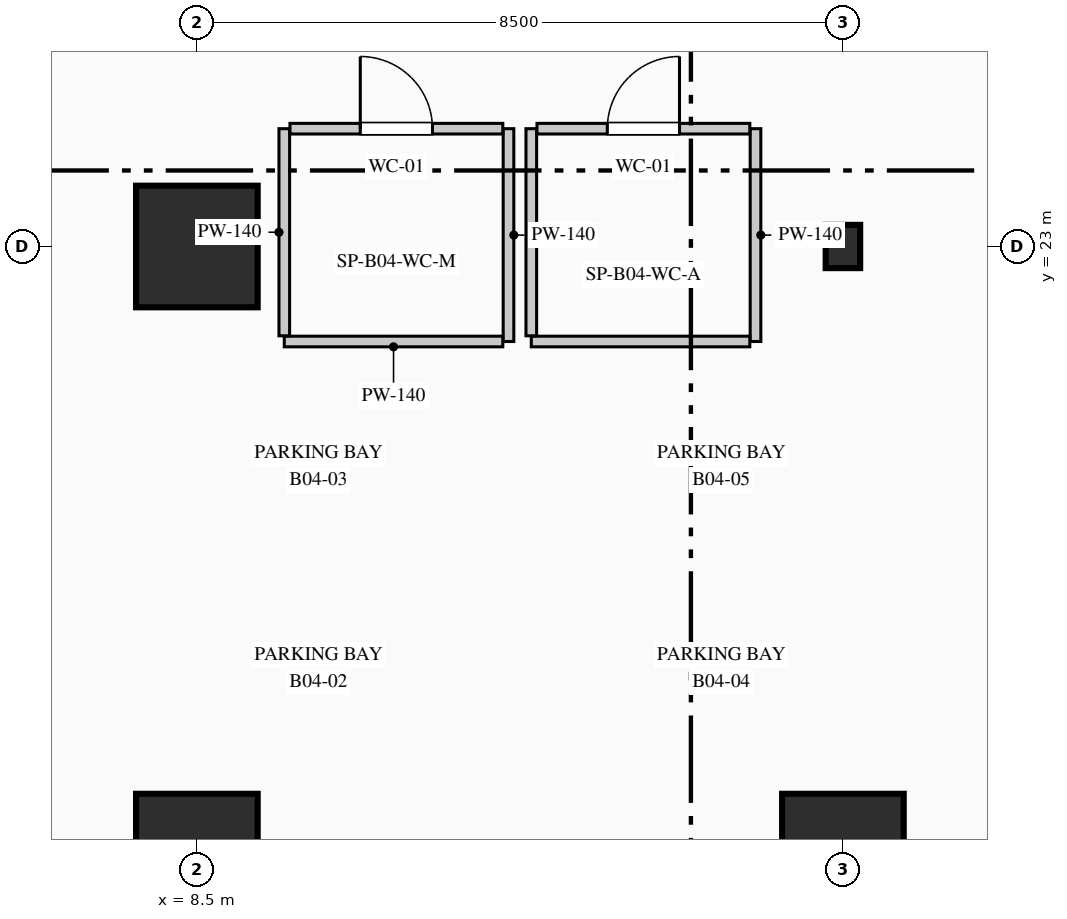
"""IFC4 building model, lengths in metres.
Left out: names, types, materials, properties, quantities, classifications, styles, units other than length and angle.
Written with IfcOpenShell. Run it as: python <this file> out.ifc"""

import sys

from ifc_helpers import new_model, si_unit, direction, frame, frame_2d, origin, origin_2d, place, context, subcontext, project, spatial, rectangle, i_section, extrude, element, fill, save


model = new_model("IFC4")
c1 = context("Model", 3, precision=1e-05, world=origin(), true_north=direction((0.0, 1.0)))
c2 = subcontext(c1, "Body", "Model", "MODEL_VIEW")
j1 = project(units=[si_unit("LENGTHUNIT", "METRE"), si_unit("PLANEANGLEUNIT", "RADIAN")], contexts=[c1])
p1 = place(None, origin())
s1 = spatial("IfcSite", under=j1, at=p1, CompositionType="ELEMENT")
p2 = place(p1, origin())
s2 = spatial("IfcBuilding", under=s1, at=p2, CompositionType="ELEMENT")
p3 = place(p2, frame((0.0, 0.0, -18.0)))
s3 = spatial("IfcBuildingStorey", under=s2, at=p3, CompositionType="ELEMENT", Elevation=-18.0)
for number, where, z_axis, x_axis in (
    (1, (8.5, 15.0, 0.0), (0.0, 0.0, 1.0), (1.0, 0.0, 0.0)),
    (2, (8.5, 23.0, 0.0), (0.0, 0.0, 1.0), (1.0, 0.0, 0.0)),
    (3, (17.0, 15.0, 0.0), (0.0, 0.0, 1.0), (1.0, 0.0, 0.0)),
):
    element("IfcColumn", number, at=place(p3, frame(where, z_axis=z_axis, x_axis=x_axis)), inside=s3, PredefinedType="COLUMN", context=c2, shape_type="SweptSolid", body=[
        extrude(rectangle(XDim=1.6, YDim=1.6, at=origin_2d()), origin(), (0.0, 0.0, 1.0), 4.5),
    ])
p4 = place(p3, frame((17.0, 23.0, 0.0), z_axis=(0.0, 0.0, 1.0), x_axis=(1.0, 0.0, 0.0)))
e4 = element("IfcColumn", 4, at=p4, inside=s3, PredefinedType="COLUMN", context=c2, shape_type="SweptSolid", body=[
    extrude(i_section(OverallWidth=0.454, OverallDepth=0.569, WebThickness=0.078, FlangeThickness=0.08, FilletRadius=0.015, at=origin_2d()), origin(), (0.0, 0.0, 1.0), 4.5),
])
p5 = place(p3, frame((12.6, 24.55, 0.0), z_axis=(0.0, 0.0, 1.0), x_axis=(0.0, -1.0, 0.0)))
e5 = element("IfcWall", 5, at=p5, inside=s3, PredefinedType="PARTITIONING", context=c2, shape_type="SweptSolid", body=[
    extrude(rectangle(XDim=2.8, YDim=0.14, at=frame_2d((1.4, 0.0))), origin(), (0.0, 0.0, 1.0), 3.62),
])
p6 = place(p3, frame((12.525, 21.75, 0.0), z_axis=(0.0, 0.0, 1.0), x_axis=(-1.0, 0.0, 0.0)))
e6 = element("IfcWall", 6, at=p6, inside=s3, PredefinedType="PARTITIONING", context=c2, shape_type="SweptSolid", body=[
    extrude(rectangle(XDim=2.875, YDim=0.14, at=frame_2d((1.438, 0.0))), origin(), (0.0, 0.0, 1.0), 4.135),
])
p7 = place(p3, frame((9.65, 21.825, 0.0), z_axis=(0.0, 0.0, 1.0), x_axis=(0.0, 1.0, 0.0)))
e7 = element("IfcWall", 7, at=p7, inside=s3, PredefinedType="PARTITIONING", context=c2, shape_type="SweptSolid", body=[
    extrude(rectangle(XDim=2.725, YDim=0.14, at=frame_2d((1.363, 0.0))), origin(), (0.0, 0.0, 1.0), 3.62),
])
p8 = place(p3, frame((9.725, 24.55, 0.0), z_axis=(0.0, 0.0, 1.0), x_axis=(1.0, 0.0, 0.0)))
e8 = element("IfcWall", 8, at=p8, inside=s3, PredefinedType="PARTITIONING", context=c2, shape_type="SweptSolid", body=[
    extrude(rectangle(XDim=2.8, YDim=0.14, at=frame_2d((1.4, 0.0))), origin(), (0.0, 0.0, 1.0), 4.135),
])
p9 = place(p8, frame((0.925, 0.0, 0.0)))
e9 = element("IfcOpeningElement", 9, at=p9, cuts=e8, PredefinedType="OPENING", context=c2, shape_type="SweptSolid", body=[
    extrude(rectangle(XDim=0.95, YDim=2.15, at=frame_2d((0.475, 1.075))), frame((0.0, 0.08, 0.0), z_axis=(0.0, -1.0, 0.0), x_axis=(1.0, 0.0, 0.0)), (0.0, 0.0, 1.0), 0.16),
])
p10 = place(p3, frame((15.85, 24.55, 0.0), z_axis=(0.0, 0.0, 1.0), x_axis=(0.0, -1.0, 0.0)))
e10 = element("IfcWall", 10, at=p10, inside=s3, PredefinedType="PARTITIONING", context=c2, shape_type="SweptSolid", body=[
    extrude(rectangle(XDim=2.8, YDim=0.14, at=frame_2d((1.4, 0.0))), origin(), (0.0, 0.0, 1.0), 3.62),
])
p11 = place(p3, frame((15.775, 21.75, 0.0), z_axis=(0.0, 0.0, 1.0), x_axis=(-1.0, 0.0, 0.0)))
e11 = element("IfcWall", 11, at=p11, inside=s3, PredefinedType="PARTITIONING", context=c2, shape_type="SweptSolid", body=[
    extrude(rectangle(XDim=2.875, YDim=0.14, at=frame_2d((1.438, 0.0))), origin(), (0.0, 0.0, 1.0), 4.135),
])
p12 = place(p3, frame((12.9, 21.825, 0.0), z_axis=(0.0, 0.0, 1.0), x_axis=(0.0, 1.0, 0.0)))
e12 = element("IfcWall", 12, at=p12, inside=s3, PredefinedType="PARTITIONING", context=c2, shape_type="SweptSolid", body=[
    extrude(rectangle(XDim=2.725, YDim=0.14, at=frame_2d((1.363, 0.0))), origin(), (0.0, 0.0, 1.0), 3.62),
])
p13 = place(p3, frame((12.975, 24.55, 0.0), z_axis=(0.0, 0.0, 1.0), x_axis=(1.0, 0.0, 0.0)))
e13 = element("IfcWall", 13, at=p13, inside=s3, PredefinedType="PARTITIONING", context=c2, shape_type="SweptSolid", body=[
    extrude(rectangle(XDim=2.8, YDim=0.14, at=frame_2d((1.4, 0.0))), origin(), (0.0, 0.0, 1.0), 4.135),
])
p14 = place(p13, frame((0.925, 0.0, 0.0)))
e14 = element("IfcOpeningElement", 14, at=p14, cuts=e13, PredefinedType="OPENING", context=c2, shape_type="SweptSolid", body=[
    extrude(rectangle(XDim=0.95, YDim=2.15, at=frame_2d((0.475, 1.075))), frame((0.0, 0.08, 0.0), z_axis=(0.0, -1.0, 0.0), x_axis=(1.0, 0.0, 0.0)), (0.0, 0.0, 1.0), 0.16),
])
p15 = place(p9, origin())
e15 = element("IfcDoor", 15, at=p15, inside=s3, OperationType="SINGLE_SWING_LEFT", PredefinedType="DOOR", context=c2, shape_type="SweptSolid", body=[
    extrude(rectangle(XDim=0.95, YDim=2.15, at=frame_2d((0.475, 1.075))), frame((0.0, 0.025, 0.0), z_axis=(0.0, -1.0, 0.0), x_axis=(1.0, 0.0, 0.0)), (0.0, 0.0, 1.0), 0.05),
])
fill(e9, e15)
p16 = place(p14, origin())
e16 = element("IfcDoor", 16, at=p16, inside=s3, OperationType="SINGLE_SWING_RIGHT", PredefinedType="DOOR", context=c2, shape_type="SweptSolid", body=[
    extrude(rectangle(XDim=0.95, YDim=2.15, at=frame_2d((0.475, 1.075))), frame((0.0, 0.025, 0.0), z_axis=(0.0, -1.0, 0.0), x_axis=(1.0, 0.0, 0.0)), (0.0, 0.0, 1.0), 0.05),
])
fill(e14, e16)
save(model, sys.argv[1])
